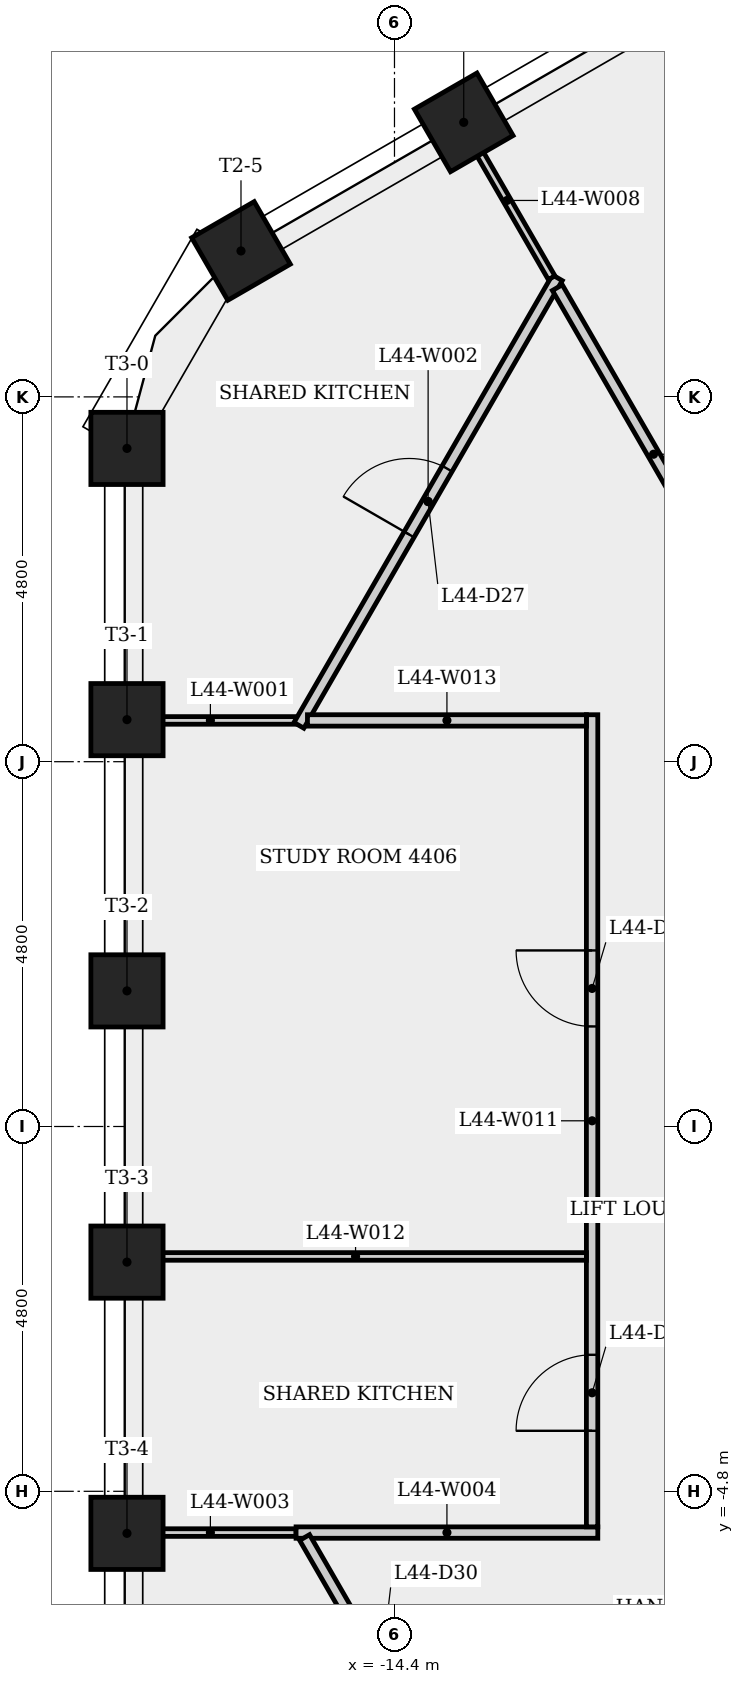
"""IFC4 building model, lengths in metres.
Left out: names, types, materials, properties, quantities, classifications, styles, units other than length and angle.
Written with IfcOpenShell. Run it as: python <this file> out.ifc"""

import sys

from ifc_helpers import new_model, si_unit, direction, frame, frame_2d, origin, origin_2d, place, context, subcontext, project, spatial, rectangle, extrude, element, fill, save


model = new_model("IFC4")
c1 = context("Model", 3, precision=1e-05, world=origin(), true_north=direction((0.0, 1.0)))
c2 = subcontext(c1, "Body", "Model", "MODEL_VIEW")
j1 = project(units=[si_unit("LENGTHUNIT", "METRE"), si_unit("PLANEANGLEUNIT", "RADIAN")], contexts=[c1])
p1 = place(None, origin())
s1 = spatial("IfcSite", under=j1, at=p1, CompositionType="ELEMENT")
p2 = place(p1, origin())
s2 = spatial("IfcBuilding", under=s1, at=p2, CompositionType="ELEMENT")
p3 = place(p2, frame((0.0, 0.0, 166.3)))
s3 = spatial("IfcBuildingStorey", under=s2, at=p3, CompositionType="ELEMENT", Elevation=166.3)
for number, where, z_axis, x_axis in (
    (1, (-13.489, 13.212, 0.0), (0.0, 0.0, 1.0), (-0.5, 0.866, 0.0)),
    (2, (-16.419, 11.52, 0.0), (0.0, 0.0, 1.0), (-0.5, 0.866, 0.0)),
    (3, (-17.919, 8.922, 0.0), (0.0, 0.0, 1.0), (-1.0, 0.0, 0.0)),
    (4, (-17.919, 5.353, 0.0), (0.0, 0.0, 1.0), (-1.0, 0.0, 0.0)),
    (5, (-17.919, 1.784, 0.0), (0.0, 0.0, 1.0), (-1.0, 0.0, 0.0)),
    (6, (-17.919, -1.784, 0.0), (0.0, 0.0, 1.0), (-1.0, 0.0, 0.0)),
    (7, (-17.919, -5.353, 0.0), (0.0, 0.0, 1.0), (-1.0, 0.0, 0.0)),
):
    element("IfcColumn", number, at=place(p3, frame(where, z_axis=z_axis, x_axis=x_axis)), inside=s3, PredefinedType="COLUMN", context=c2, shape_type="SweptSolid", body=[
        extrude(rectangle(XDim=0.95, YDim=0.95, at=origin_2d()), origin(), (0.0, 0.0, 1.0), 3.4),
    ])
p4 = place(p3, frame((-15.695, 5.343, 0.0), z_axis=(0.0, 0.0, 1.0), x_axis=(-1.0, 0.0, 0.0)))
e8 = element("IfcWall", 8, at=p4, inside=s3, PredefinedType="PARTITIONING", context=c2, shape_type="SweptSolid", body=[
    extrude(rectangle(XDim=2.254, YDim=0.1, at=frame_2d((1.127, 0.0))), origin(), (0.0, 0.0, 1.0), 3.05),
])
p5 = place(p3, frame((-15.657, 5.278, 0.0), z_axis=(0.0, 0.0, 1.0), x_axis=(0.499988676607, 0.86603194125, 0.0)))
e9 = element("IfcWall", 9, at=p5, inside=s3, PredefinedType="PARTITIONING", context=c2, shape_type="SweptSolid", body=[
    extrude(rectangle(XDim=6.801, YDim=0.15, at=frame_2d((3.4, 0.0))), origin(), (0.0, 0.0, 1.0), 3.05),
])
p6 = place(p5, frame((2.9, 0.0, 0.0)))
e10 = element("IfcOpeningElement", 10, at=p6, cuts=e9, PredefinedType="OPENING", context=c2, shape_type="SweptSolid", body=[
    extrude(rectangle(XDim=1.0, YDim=2.1, at=frame_2d((0.5, 1.05))), frame((0.0, 0.085, 0.0), z_axis=(0.0, -1.0, 0.0), x_axis=(1.0, 0.0, 0.0)), (0.0, 0.0, 1.0), 0.17),
])
p7 = place(p3, frame((-15.695, -5.343, 0.0), z_axis=(0.0, 0.0, 1.0), x_axis=(-1.0, 0.0, 0.0)))
e11 = element("IfcWall", 11, at=p7, inside=s3, PredefinedType="PARTITIONING", context=c2, shape_type="SweptSolid", body=[
    extrude(rectangle(XDim=2.254, YDim=0.1, at=frame_2d((1.127, 0.0))), origin(), (0.0, 0.0, 1.0), 3.05),
])
p8 = place(p3, frame((-15.695, -5.343, 0.0), z_axis=(0.0, 0.0, 1.0), x_axis=(1.0, 0.0, 0.0)))
e12 = element("IfcWall", 12, at=p8, inside=s3, PredefinedType="PARTITIONING", context=c2, shape_type="SweptSolid", body=[
    extrude(rectangle(XDim=3.97, YDim=0.15, at=frame_2d((1.985, 0.0))), origin(), (0.0, 0.0, 1.0), 3.05),
])
p9 = place(p3, frame((-13.572, -8.891, 0.0), z_axis=(0.0, 0.0, 1.0), x_axis=(-0.500004480819, 0.866022816767, 0.0)))
e13 = element("IfcWall", 13, at=p9, inside=s3, PredefinedType="PARTITIONING", context=c2, shape_type="SweptSolid", body=[
    extrude(rectangle(XDim=4.021, YDim=0.15, at=frame_2d((2.011, 0.0))), origin(), (0.0, 0.0, 1.0), 3.05),
])
p10 = place(p9, frame((1.511, 0.0, 0.0)))
e14 = element("IfcOpeningElement", 14, at=p10, cuts=e13, PredefinedType="OPENING", context=c2, shape_type="SweptSolid", body=[
    extrude(rectangle(XDim=1.0, YDim=2.1, at=frame_2d((0.5, 1.05))), frame((0.0, 0.085, 0.0), z_axis=(0.0, -1.0, 0.0), x_axis=(1.0, 0.0, 0.0)), (0.0, 0.0, 1.0), 0.17),
])
p11 = place(p3, frame((-13.507, 13.202, 0.0), z_axis=(0.0, 0.0, 1.0), x_axis=(0.499995339376, -0.86602809458, 0.0)))
e15 = element("IfcWall", 15, at=p11, inside=s3, PredefinedType="PARTITIONING", context=c2, shape_type="SweptSolid", body=[
    extrude(rectangle(XDim=2.349, YDim=0.1, at=frame_2d((1.175, 0.0))), origin(), (0.0, 0.0, 1.0), 3.05),
])
p12 = place(p3, frame((-12.257, 11.038, 0.0), z_axis=(0.0, 0.0, 1.0), x_axis=(0.499997969693, -0.866026575979, 0.0)))
e16 = element("IfcWall", 16, at=p12, inside=s3, PredefinedType="PARTITIONING", context=c2, shape_type="SweptSolid", body=[
    extrude(rectangle(XDim=5.062, YDim=0.15, at=frame_2d((2.531, 0.0))), origin(), (0.0, 0.0, 1.0), 3.05),
])
p13 = place(p3, frame((-11.8, -5.268, 0.0), z_axis=(0.0, 0.0, 1.0), x_axis=(0.0, 1.0, 0.0)))
e17 = element("IfcWall", 17, at=p13, inside=s3, PredefinedType="PARTITIONING", context=c2, shape_type="SweptSolid", body=[
    extrude(rectangle(XDim=10.686, YDim=0.15, at=frame_2d((5.343, 0.0))), origin(), (0.0, 0.0, 1.0), 3.05),
])
p14 = place(p13, frame((6.585, 0.0, 0.0)))
e18 = element("IfcOpeningElement", 18, at=p14, cuts=e17, PredefinedType="OPENING", context=c2, shape_type="SweptSolid", body=[
    extrude(rectangle(XDim=1.0, YDim=2.1, at=frame_2d((0.5, 1.05))), frame((0.0, 0.085, 0.0), z_axis=(0.0, -1.0, 0.0), x_axis=(1.0, 0.0, 0.0)), (0.0, 0.0, 1.0), 0.17),
])
p15 = place(p13, frame((1.264, 0.0, 0.0)))
e19 = element("IfcOpeningElement", 19, at=p15, cuts=e17, PredefinedType="OPENING", context=c2, shape_type="SweptSolid", body=[
    extrude(rectangle(XDim=1.0, YDim=2.1, at=frame_2d((0.5, 1.05))), frame((0.0, 0.085, 0.0), z_axis=(0.0, -1.0, 0.0), x_axis=(1.0, 0.0, 0.0)), (0.0, 0.0, 1.0), 0.17),
])
p16 = place(p3, frame((-11.875, -1.71, 0.0), z_axis=(0.0, 0.0, 1.0), x_axis=(-1.0, 0.0, 0.0)))
e20 = element("IfcWall", 20, at=p16, inside=s3, PredefinedType="PARTITIONING", context=c2, shape_type="SweptSolid", body=[
    extrude(rectangle(XDim=6.074, YDim=0.1, at=frame_2d((3.037, 0.0))), origin(), (0.0, 0.0, 1.0), 3.05),
])
p17 = place(p3, frame((-11.875, 5.343, 0.0), z_axis=(0.0, 0.0, 1.0), x_axis=(-1.0, 0.0, 0.0)))
e21 = element("IfcWall", 21, at=p17, inside=s3, PredefinedType="PARTITIONING", context=c2, shape_type="SweptSolid", body=[
    extrude(rectangle(XDim=3.67, YDim=0.15, at=frame_2d((1.835, 0.0))), origin(), (0.0, 0.0, 1.0), 3.05),
])
p18 = place(p6, origin())
e22 = element("IfcDoor", 22, at=p18, inside=s3, OperationType="SINGLE_SWING_LEFT", PredefinedType="DOOR", context=c2, shape_type="SweptSolid", body=[
    extrude(rectangle(XDim=1.0, YDim=2.1, at=frame_2d((0.5, 1.05))), frame((0.0, 0.025, 0.0), z_axis=(0.0, -1.0, 0.0), x_axis=(1.0, 0.0, 0.0)), (0.0, 0.0, 1.0), 0.05),
])
fill(e10, e22)
p19 = place(p14, origin())
e23 = element("IfcDoor", 23, at=p19, inside=s3, OperationType="SINGLE_SWING_RIGHT", PredefinedType="DOOR", context=c2, shape_type="SweptSolid", body=[
    extrude(rectangle(XDim=1.0, YDim=2.1, at=frame_2d((0.5, 1.05))), frame((0.0, 0.025, 0.0), z_axis=(0.0, -1.0, 0.0), x_axis=(1.0, 0.0, 0.0)), (0.0, 0.0, 1.0), 0.05),
])
fill(e18, e23)
p20 = place(p15, origin())
e24 = element("IfcDoor", 24, at=p20, inside=s3, OperationType="SINGLE_SWING_LEFT", PredefinedType="DOOR", context=c2, shape_type="SweptSolid", body=[
    extrude(rectangle(XDim=1.0, YDim=2.1, at=frame_2d((0.5, 1.05))), frame((0.0, 0.025, 0.0), z_axis=(0.0, -1.0, 0.0), x_axis=(1.0, 0.0, 0.0)), (0.0, 0.0, 1.0), 0.05),
])
fill(e19, e24)
save(model, sys.argv[1])
